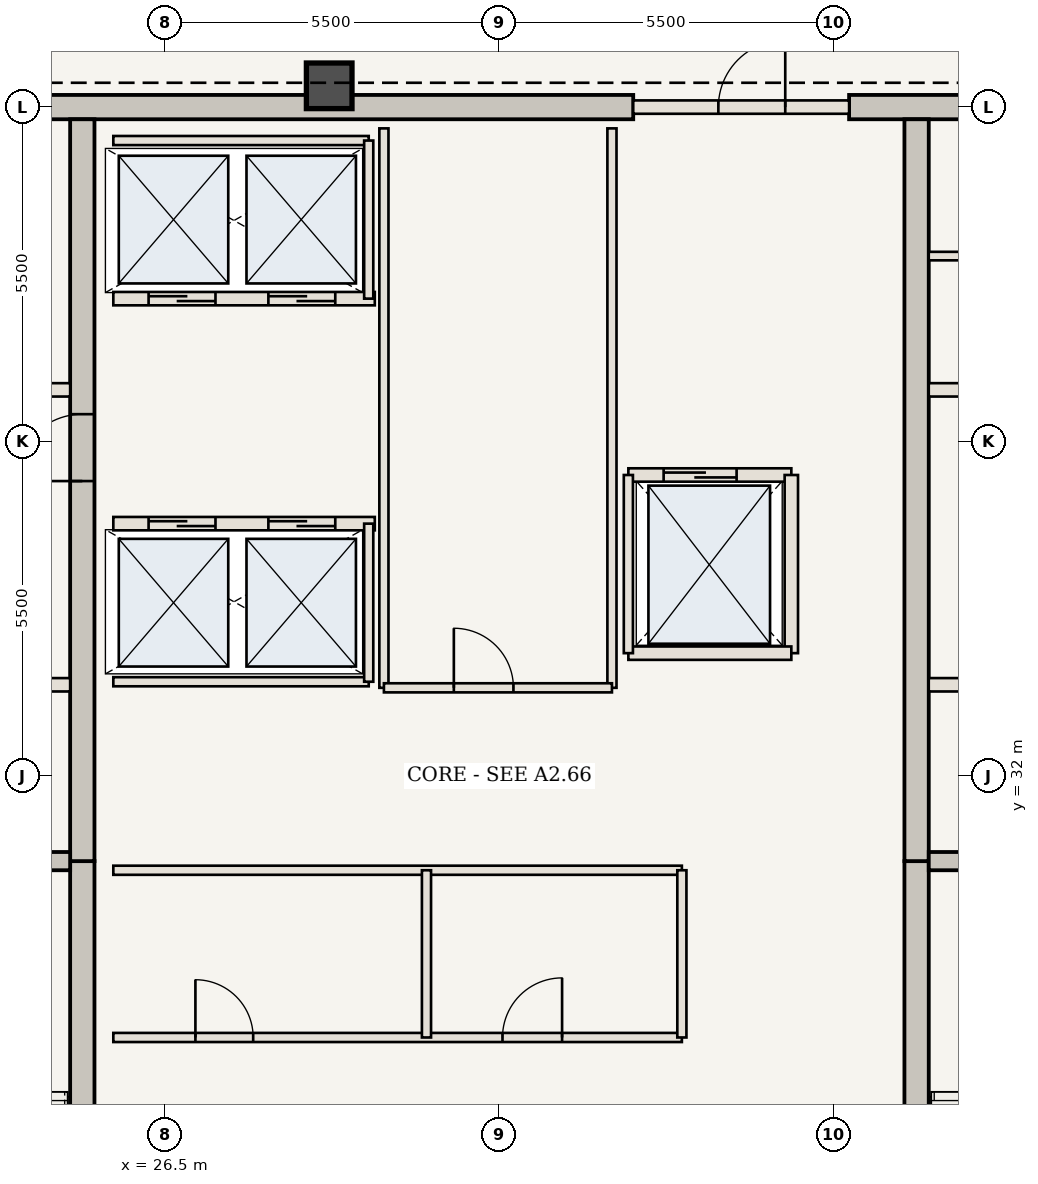
"""IFC4 building model, lengths in metres.
Left out: names, types, materials, properties, quantities, classifications, styles, units other than length and angle.
Written with IfcOpenShell. Run it as: python <this file> out.ifc"""

import sys

from ifc_helpers import new_model, si_unit, direction, frame, frame_2d, origin, origin_2d, place, context, subcontext, project, spatial, rectangle, extrude, element, fill, save


model = new_model("IFC4")
c1 = context("Model", 3, precision=1e-05, world=origin(), true_north=direction((0.0, 1.0)))
c2 = subcontext(c1, "Body", "Model", "MODEL_VIEW")
j1 = project(units=[si_unit("LENGTHUNIT", "METRE"), si_unit("PLANEANGLEUNIT", "RADIAN")], contexts=[c1])
p1 = place(None, origin())
s1 = spatial("IfcSite", under=j1, at=p1, CompositionType="ELEMENT")
p2 = place(p1, origin())
s2 = spatial("IfcBuilding", under=s1, at=p2, CompositionType="ELEMENT")
p3 = place(p2, frame((0.0, 0.0, 308.35)))
s3 = spatial("IfcBuildingStorey", under=s2, at=p3, CompositionType="ELEMENT", Elevation=308.35)
p4 = place(p3, frame((21.41, 43.0, 0.0), z_axis=(0.0, 0.0, 1.0), x_axis=(1.0, 0.0, 0.0)))
e1 = element("IfcWall", 1, at=p4, inside=s3, PredefinedType="SHEAR", context=c2, shape_type="SweptSolid", body=[
    extrude(rectangle(XDim=12.79, YDim=0.4, at=frame_2d((6.395, 0.0))), origin(), (0.0, 0.0, 1.0), 4.9),
])
p5 = place(p3, frame((37.75, 43.0, 0.0), z_axis=(0.0, 0.0, 1.0), x_axis=(1.0, 0.0, 0.0)))
e2 = element("IfcWall", 2, at=p5, inside=s3, PredefinedType="SHEAR", context=c2, shape_type="SweptSolid", body=[
    extrude(rectangle(XDim=4.84, YDim=0.4, at=frame_2d((2.42, 0.0))), origin(), (0.0, 0.0, 1.0), 4.9),
])
p6 = place(p3, frame((25.14, 21.15, 0.0), z_axis=(0.0, 0.0, 1.0), x_axis=(0.0, 1.0, 0.0)))
e3 = element("IfcWall", 3, at=p6, inside=s3, PredefinedType="SHEAR", context=c2, shape_type="SweptSolid", body=[
    extrude(rectangle(XDim=9.45, YDim=0.4, at=frame_2d((4.725, 0.0))), origin(), (0.0, 0.0, 1.0), 4.9),
])
p7 = place(p3, frame((25.14, 30.6, 0.0), z_axis=(0.0, 0.0, 1.0), x_axis=(0.0, 1.0, 0.0)))
e4 = element("IfcWall", 4, at=p7, inside=s3, PredefinedType="SHEAR", context=c2, shape_type="SweptSolid", body=[
    extrude(rectangle(XDim=12.2, YDim=0.4, at=frame_2d((6.1, 0.0))), origin(), (0.0, 0.0, 1.0), 4.9),
])
p8 = place(p7, frame((6.25, 0.0, 0.0)))
e5 = element("IfcOpeningElement", 5, at=p8, cuts=e4, PredefinedType="OPENING", context=c2, shape_type="SweptSolid", body=[
    extrude(rectangle(XDim=1.1, YDim=2.15, at=frame_2d((0.55, 1.075))), frame((0.0, 0.21, 0.0), z_axis=(0.0, -1.0, 0.0), x_axis=(1.0, 0.0, 0.0)), (0.0, 0.0, 1.0), 0.42),
])
p9 = place(p3, frame((38.86, 21.15, 0.0), z_axis=(0.0, 0.0, 1.0), x_axis=(0.0, 1.0, 0.0)))
e6 = element("IfcWall", 6, at=p9, inside=s3, PredefinedType="SHEAR", context=c2, shape_type="SweptSolid", body=[
    extrude(rectangle(XDim=9.45, YDim=0.4, at=frame_2d((4.725, 0.0))), origin(), (0.0, 0.0, 1.0), 4.9),
])
p10 = place(p3, frame((38.86, 30.6, 0.0), z_axis=(0.0, 0.0, 1.0), x_axis=(0.0, 1.0, 0.0)))
e7 = element("IfcWall", 7, at=p10, inside=s3, PredefinedType="SHEAR", context=c2, shape_type="SweptSolid", body=[
    extrude(rectangle(XDim=12.2, YDim=0.4, at=frame_2d((6.1, 0.0))), origin(), (0.0, 0.0, 1.0), 4.9),
])
p11 = place(p3, frame((29.2, 43.35, 0.0), z_axis=(0.0, 0.0, 1.0), x_axis=(1.0, 0.0, 0.0)))
e8 = element("IfcColumn", 8, at=p11, inside=s3, PredefinedType="COLUMN", context=c2, shape_type="SweptSolid", body=[
    extrude(rectangle(XDim=0.75, YDim=0.75, at=origin_2d()), origin(), (0.0, 0.0, 1.0), 4.9),
])
for number, where, z_axis, x_axis in (
    (9, (21.41, 30.6, 0.0), (0.0, 0.0, 1.0), (1.0, 0.0, 0.0)),
    (10, (39.06, 30.6, 0.0), (0.0, 0.0, 1.0), (1.0, 0.0, 0.0)),
):
    element("IfcWall", number, at=place(p3, frame(where, z_axis=z_axis, x_axis=x_axis)), inside=s3, PredefinedType="SHEAR", context=c2, shape_type="SweptSolid", body=[
        extrude(rectangle(XDim=3.53, YDim=0.3, at=frame_2d((1.765, 0.0))), origin(), (0.0, 0.0, 1.0), 4.64),
    ])
p12 = place(p3, frame((21.41, 33.5, 0.0), z_axis=(0.0, 0.0, 1.0), x_axis=(1.0, 0.0, 0.0)))
e11 = element("IfcWall", 11, at=p12, inside=s3, PredefinedType="STANDARD", context=c2, shape_type="SweptSolid", body=[
    extrude(rectangle(XDim=3.53, YDim=0.22, at=frame_2d((1.765, 0.0))), origin(), (0.0, 0.0, 1.0), 4.64),
])
p13 = place(p12, frame((0.75, 0.0, 0.0)))
e12 = element("IfcOpeningElement", 12, at=p13, cuts=e11, PredefinedType="OPENING", context=c2, shape_type="SweptSolid", body=[
    extrude(rectangle(XDim=1.2, YDim=2.2, at=frame_2d((0.6, 1.1))), frame((0.0, 0.12, 0.0), z_axis=(0.0, -1.0, 0.0), x_axis=(1.0, 0.0, 0.0)), (0.0, 0.0, 1.0), 0.24),
])
p14 = place(p3, frame((39.06, 33.5, 0.0), z_axis=(0.0, 0.0, 1.0), x_axis=(1.0, 0.0, 0.0)))
e13 = element("IfcWall", 13, at=p14, inside=s3, PredefinedType="STANDARD", context=c2, shape_type="SweptSolid", body=[
    extrude(rectangle(XDim=3.53, YDim=0.22, at=frame_2d((1.765, 0.0))), origin(), (0.0, 0.0, 1.0), 4.64),
])
p15 = place(p14, frame((1.55, 0.0, 0.0)))
e14 = element("IfcOpeningElement", 14, at=p15, cuts=e13, PredefinedType="OPENING", context=c2, shape_type="SweptSolid", body=[
    extrude(rectangle(XDim=1.2, YDim=2.2, at=frame_2d((0.6, 1.1))), frame((0.0, 0.12, 0.0), z_axis=(0.0, -1.0, 0.0), x_axis=(1.0, 0.0, 0.0)), (0.0, 0.0, 1.0), 0.24),
])
for number, where, z_axis, x_axis in (
    (15, (21.41, 38.35, 0.0), (0.0, 0.0, 1.0), (1.0, 0.0, 0.0)),
    (16, (39.06, 38.35, 0.0), (0.0, 0.0, 1.0), (1.0, 0.0, 0.0)),
):
    element("IfcWall", number, at=place(p3, frame(where, z_axis=z_axis, x_axis=x_axis)), inside=s3, PredefinedType="STANDARD", context=c2, shape_type="SweptSolid", body=[
        extrude(rectangle(XDim=3.53, YDim=0.22, at=frame_2d((1.765, 0.0))), origin(), (0.0, 0.0, 1.0), 4.64),
    ])
p16 = place(p3, frame((39.06, 40.55, 0.0), z_axis=(0.0, 0.0, 1.0), x_axis=(1.0, 0.0, 0.0)))
e17 = element("IfcWall", 17, at=p16, inside=s3, PredefinedType="STANDARD", context=c2, shape_type="SweptSolid", body=[
    extrude(rectangle(XDim=3.53, YDim=0.14, at=frame_2d((1.765, 0.0))), origin(), (0.0, 0.0, 1.0), 4.64),
])
p17 = place(p3, frame((25.65, 27.7, 0.0), z_axis=(0.0, 0.0, 1.0), x_axis=(1.0, 0.0, 0.0)))
e18 = element("IfcWall", 18, at=p17, inside=s3, PredefinedType="STANDARD", context=c2, shape_type="SweptSolid", body=[
    extrude(rectangle(XDim=9.35, YDim=0.15, at=frame_2d((4.675, 0.0))), origin(), (0.0, 0.0, 1.0), 4.64),
])
p18 = place(p17, frame((1.35, 0.0, 0.0)))
e19 = element("IfcOpeningElement", 19, at=p18, cuts=e18, PredefinedType="OPENING", context=c2, shape_type="SweptSolid", body=[
    extrude(rectangle(XDim=0.95, YDim=2.15, at=frame_2d((0.475, 1.075))), frame((0.0, 0.085, 0.0), z_axis=(0.0, -1.0, 0.0), x_axis=(1.0, 0.0, 0.0)), (0.0, 0.0, 1.0), 0.17),
])
p19 = place(p17, frame((6.4, 0.0, 0.0)))
e20 = element("IfcOpeningElement", 20, at=p19, cuts=e18, PredefinedType="OPENING", context=c2, shape_type="SweptSolid", body=[
    extrude(rectangle(XDim=0.98, YDim=2.2, at=frame_2d((0.49, 1.1))), frame((0.0, 0.085, 0.0), z_axis=(0.0, -1.0, 0.0), x_axis=(1.0, 0.0, 0.0)), (0.0, 0.0, 1.0), 0.17),
])
p20 = place(p3, frame((25.65, 30.45, 0.0), z_axis=(0.0, 0.0, 1.0), x_axis=(1.0, 0.0, 0.0)))
e21 = element("IfcWall", 21, at=p20, inside=s3, PredefinedType="STANDARD", context=c2, shape_type="SweptSolid", body=[
    extrude(rectangle(XDim=9.35, YDim=0.15, at=frame_2d((4.675, 0.0))), origin(), (0.0, 0.0, 1.0), 4.64),
])
for number, where, z_axis, x_axis in (
    (22, (30.8, 27.7, 0.0), (0.0, 0.0, 1.0), (0.0, 1.0, 0.0)),
    (23, (35.0, 27.7, 0.0), (0.0, 0.0, 1.0), (0.0, 1.0, 0.0)),
):
    element("IfcWall", number, at=place(p3, frame(where, z_axis=z_axis, x_axis=x_axis)), inside=s3, PredefinedType="STANDARD", context=c2, shape_type="SweptSolid", body=[
        extrude(rectangle(XDim=2.75, YDim=0.15, at=frame_2d((1.375, 0.0))), origin(), (0.0, 0.0, 1.0), 4.64),
    ])
p21 = place(p3, frame((25.65, 36.15, 0.0), z_axis=(0.0, 0.0, 1.0), x_axis=(1.0, 0.0, 0.0)))
e24 = element("IfcWall", 24, at=p21, inside=s3, PredefinedType="STANDARD", context=c2, shape_type="SweptSolid", body=[
    extrude(rectangle(XDim=4.3, YDim=0.22, at=frame_2d((2.15, 0.0))), origin(), (0.0, 0.0, 1.0), 4.64),
])
p22 = place(p21, frame((0.58, 0.0, 0.0)))
e25 = element("IfcOpeningElement", 25, at=p22, cuts=e24, PredefinedType="OPENING", context=c2, shape_type="SweptSolid", body=[
    extrude(rectangle(XDim=1.1, YDim=2.15, at=frame_2d((0.55, 1.075))), frame((0.0, 0.12, 0.0), z_axis=(0.0, -1.0, 0.0), x_axis=(1.0, 0.0, 0.0)), (0.0, 0.0, 1.0), 0.24),
])
p23 = place(p21, frame((2.55, 0.0, 0.0)))
e26 = element("IfcOpeningElement", 26, at=p23, cuts=e24, PredefinedType="OPENING", context=c2, shape_type="SweptSolid", body=[
    extrude(rectangle(XDim=1.1, YDim=2.15, at=frame_2d((0.55, 1.075))), frame((0.0, 0.12, 0.0), z_axis=(0.0, -1.0, 0.0), x_axis=(1.0, 0.0, 0.0)), (0.0, 0.0, 1.0), 0.24),
])
p24 = place(p3, frame((25.65, 33.55, 0.0), z_axis=(0.0, 0.0, 1.0), x_axis=(1.0, 0.0, 0.0)))
e27 = element("IfcWall", 27, at=p24, inside=s3, PredefinedType="STANDARD", context=c2, shape_type="SweptSolid", body=[
    extrude(rectangle(XDim=4.2, YDim=0.15, at=frame_2d((2.1, 0.0))), origin(), (0.0, 0.0, 1.0), 4.64),
])
p25 = place(p3, frame((29.85, 33.55, 0.0), z_axis=(0.0, 0.0, 1.0), x_axis=(0.0, 1.0, 0.0)))
e28 = element("IfcWall", 28, at=p25, inside=s3, PredefinedType="STANDARD", context=c2, shape_type="SweptSolid", body=[
    extrude(rectangle(XDim=2.6, YDim=0.15, at=frame_2d((1.3, 0.0))), origin(), (0.0, 0.0, 1.0), 4.64),
])
p26 = place(p3, frame((25.65, 39.85, 0.0), z_axis=(0.0, 0.0, 1.0), x_axis=(1.0, 0.0, 0.0)))
e29 = element("IfcWall", 29, at=p26, inside=s3, PredefinedType="STANDARD", context=c2, shape_type="SweptSolid", body=[
    extrude(rectangle(XDim=4.3, YDim=0.22, at=frame_2d((2.15, 0.0))), origin(), (0.0, 0.0, 1.0), 4.64),
])
p27 = place(p26, frame((0.58, 0.0, 0.0)))
e30 = element("IfcOpeningElement", 30, at=p27, cuts=e29, PredefinedType="OPENING", context=c2, shape_type="SweptSolid", body=[
    extrude(rectangle(XDim=1.1, YDim=2.15, at=frame_2d((0.55, 1.075))), frame((0.0, 0.12, 0.0), z_axis=(0.0, -1.0, 0.0), x_axis=(1.0, 0.0, 0.0)), (0.0, 0.0, 1.0), 0.24),
])
p28 = place(p26, frame((2.55, 0.0, 0.0)))
e31 = element("IfcOpeningElement", 31, at=p28, cuts=e29, PredefinedType="OPENING", context=c2, shape_type="SweptSolid", body=[
    extrude(rectangle(XDim=1.1, YDim=2.15, at=frame_2d((0.55, 1.075))), frame((0.0, 0.12, 0.0), z_axis=(0.0, -1.0, 0.0), x_axis=(1.0, 0.0, 0.0)), (0.0, 0.0, 1.0), 0.24),
])
p29 = place(p3, frame((25.65, 42.45, 0.0), z_axis=(0.0, 0.0, 1.0), x_axis=(1.0, 0.0, 0.0)))
e32 = element("IfcWall", 32, at=p29, inside=s3, PredefinedType="STANDARD", context=c2, shape_type="SweptSolid", body=[
    extrude(rectangle(XDim=4.2, YDim=0.15, at=frame_2d((2.1, 0.0))), origin(), (0.0, 0.0, 1.0), 4.64),
])
p30 = place(p3, frame((29.85, 39.85, 0.0), z_axis=(0.0, 0.0, 1.0), x_axis=(0.0, 1.0, 0.0)))
e33 = element("IfcWall", 33, at=p30, inside=s3, PredefinedType="STANDARD", context=c2, shape_type="SweptSolid", body=[
    extrude(rectangle(XDim=2.6, YDim=0.15, at=frame_2d((1.3, 0.0))), origin(), (0.0, 0.0, 1.0), 4.64),
])
for number, where, z_axis, x_axis in (
    (34, (30.1, 33.45, 0.0), (0.0, 0.0, 1.0), (0.0, 1.0, 0.0)),
    (35, (33.85, 33.45, 0.0), (0.0, 0.0, 1.0), (0.0, 1.0, 0.0)),
):
    element("IfcWall", number, at=place(p3, frame(where, z_axis=z_axis, x_axis=x_axis)), inside=s3, PredefinedType="STANDARD", context=c2, shape_type="SweptSolid", body=[
        extrude(rectangle(XDim=9.2, YDim=0.15, at=frame_2d((4.6, 0.0))), origin(), (0.0, 0.0, 1.0), 4.64),
    ])
p31 = place(p3, frame((30.1, 33.45, 0.0), z_axis=(0.0, 0.0, 1.0), x_axis=(1.0, 0.0, 0.0)))
e36 = element("IfcWall", 36, at=p31, inside=s3, PredefinedType="STANDARD", context=c2, shape_type="SweptSolid", body=[
    extrude(rectangle(XDim=3.75, YDim=0.15, at=frame_2d((1.875, 0.0))), origin(), (0.0, 0.0, 1.0), 4.64),
])
p32 = place(p31, frame((1.15, 0.0, 0.0)))
e37 = element("IfcOpeningElement", 37, at=p32, cuts=e36, PredefinedType="OPENING", context=c2, shape_type="SweptSolid", body=[
    extrude(rectangle(XDim=0.98, YDim=2.2, at=frame_2d((0.49, 1.1))), frame((0.0, 0.085, 0.0), z_axis=(0.0, -1.0, 0.0), x_axis=(1.0, 0.0, 0.0)), (0.0, 0.0, 1.0), 0.17),
])
p33 = place(p3, frame((34.2, 43.0, 0.0), z_axis=(0.0, 0.0, 1.0), x_axis=(1.0, 0.0, 0.0)))
e38 = element("IfcWall", 38, at=p33, inside=s3, PredefinedType="STANDARD", context=c2, shape_type="SweptSolid", body=[
    extrude(rectangle(XDim=3.55, YDim=0.22, at=frame_2d((1.775, 0.0))), origin(), (0.0, 0.0, 1.0), 4.64),
])
p34 = place(p33, frame((1.4, 0.0, 0.0)))
e39 = element("IfcOpeningElement", 39, at=p34, cuts=e38, PredefinedType="OPENING", context=c2, shape_type="SweptSolid", body=[
    extrude(rectangle(XDim=1.1, YDim=2.15, at=frame_2d((0.55, 1.075))), frame((0.0, 0.12, 0.0), z_axis=(0.0, -1.0, 0.0), x_axis=(1.0, 0.0, 0.0)), (0.0, 0.0, 1.0), 0.24),
])
p35 = place(p3, frame((34.12, 36.95, 0.0), z_axis=(0.0, 0.0, 1.0), x_axis=(1.0, 0.0, 0.0)))
e40 = element("IfcWall", 40, at=p35, inside=s3, PredefinedType="STANDARD", context=c2, shape_type="SweptSolid", body=[
    extrude(rectangle(XDim=2.68, YDim=0.22, at=frame_2d((1.34, 0.0))), origin(), (0.0, 0.0, 1.0), 4.64),
])
p36 = place(p35, frame((0.58, 0.0, 0.0)))
e41 = element("IfcOpeningElement", 41, at=p36, cuts=e40, PredefinedType="OPENING", context=c2, shape_type="SweptSolid", body=[
    extrude(rectangle(XDim=1.2, YDim=2.2, at=frame_2d((0.6, 1.1))), frame((0.0, 0.12, 0.0), z_axis=(0.0, -1.0, 0.0), x_axis=(1.0, 0.0, 0.0)), (0.0, 0.0, 1.0), 0.24),
])
p37 = place(p3, frame((36.8, 34.02, 0.0), z_axis=(0.0, 0.0, 1.0), x_axis=(0.0, 1.0, 0.0)))
e42 = element("IfcWall", 42, at=p37, inside=s3, PredefinedType="STANDARD", context=c2, shape_type="SweptSolid", body=[
    extrude(rectangle(XDim=2.93, YDim=0.22, at=frame_2d((1.465, 0.0))), origin(), (0.0, 0.0, 1.0), 4.64),
])
p38 = place(p3, frame((34.12, 34.02, 0.0), z_axis=(0.0, 0.0, 1.0), x_axis=(1.0, 0.0, 0.0)))
e43 = element("IfcWall", 43, at=p38, inside=s3, PredefinedType="STANDARD", context=c2, shape_type="SweptSolid", body=[
    extrude(rectangle(XDim=2.68, YDim=0.22, at=frame_2d((1.34, 0.0))), origin(), (0.0, 0.0, 1.0), 4.64),
])
p39 = place(p3, frame((34.12, 34.02, 0.0), z_axis=(0.0, 0.0, 1.0), x_axis=(0.0, 1.0, 0.0)))
e44 = element("IfcWall", 44, at=p39, inside=s3, PredefinedType="STANDARD", context=c2, shape_type="SweptSolid", body=[
    extrude(rectangle(XDim=2.93, YDim=0.15, at=frame_2d((1.465, 0.0))), origin(), (0.0, 0.0, 1.0), 4.64),
])
p40 = place(p8, origin())
e45 = element("IfcDoor", 45, at=p40, inside=s3, OperationType="SINGLE_SWING_LEFT", PredefinedType="DOOR", context=c2, shape_type="SweptSolid", body=[
    extrude(rectangle(XDim=1.1, YDim=2.15, at=frame_2d((0.55, 1.075))), frame((0.0, 0.025, 0.0), z_axis=(0.0, -1.0, 0.0), x_axis=(1.0, 0.0, 0.0)), (0.0, 0.0, 1.0), 0.05),
])
fill(e5, e45)
p41 = place(p18, origin())
e46 = element("IfcDoor", 46, at=p41, inside=s3, OperationType="SINGLE_SWING_LEFT", PredefinedType="DOOR", context=c2, shape_type="SweptSolid", body=[
    extrude(rectangle(XDim=0.95, YDim=2.15, at=frame_2d((0.475, 1.075))), frame((0.0, 0.025, 0.0), z_axis=(0.0, -1.0, 0.0), x_axis=(1.0, 0.0, 0.0)), (0.0, 0.0, 1.0), 0.05),
])
fill(e19, e46)
p42 = place(p19, origin())
e47 = element("IfcDoor", 47, at=p42, inside=s3, OperationType="SINGLE_SWING_RIGHT", PredefinedType="DOOR", context=c2, shape_type="SweptSolid", body=[
    extrude(rectangle(XDim=0.98, YDim=2.2, at=frame_2d((0.49, 1.1))), frame((0.0, 0.025, 0.0), z_axis=(0.0, -1.0, 0.0), x_axis=(1.0, 0.0, 0.0)), (0.0, 0.0, 1.0), 0.05),
])
fill(e20, e47)
p43 = place(p22, origin())
e48 = element("IfcDoor", 48, at=p43, inside=s3, OperationType="DOUBLE_DOOR_SLIDING", PredefinedType="DOOR", context=c2, shape_type="SweptSolid", body=[
    extrude(rectangle(XDim=1.1, YDim=2.15, at=frame_2d((0.55, 1.075))), frame((0.0, 0.025, 0.0), z_axis=(0.0, -1.0, 0.0), x_axis=(1.0, 0.0, 0.0)), (0.0, 0.0, 1.0), 0.05),
])
fill(e25, e48)
p44 = place(p23, origin())
e49 = element("IfcDoor", 49, at=p44, inside=s3, OperationType="DOUBLE_DOOR_SLIDING", PredefinedType="DOOR", context=c2, shape_type="SweptSolid", body=[
    extrude(rectangle(XDim=1.1, YDim=2.15, at=frame_2d((0.55, 1.075))), frame((0.0, 0.025, 0.0), z_axis=(0.0, -1.0, 0.0), x_axis=(1.0, 0.0, 0.0)), (0.0, 0.0, 1.0), 0.05),
])
fill(e26, e49)
p45 = place(p27, origin())
e50 = element("IfcDoor", 50, at=p45, inside=s3, OperationType="DOUBLE_DOOR_SLIDING", PredefinedType="DOOR", context=c2, shape_type="SweptSolid", body=[
    extrude(rectangle(XDim=1.1, YDim=2.15, at=frame_2d((0.55, 1.075))), frame((0.0, 0.025, 0.0), z_axis=(0.0, -1.0, 0.0), x_axis=(1.0, 0.0, 0.0)), (0.0, 0.0, 1.0), 0.05),
])
fill(e30, e50)
p46 = place(p28, origin())
e51 = element("IfcDoor", 51, at=p46, inside=s3, OperationType="DOUBLE_DOOR_SLIDING", PredefinedType="DOOR", context=c2, shape_type="SweptSolid", body=[
    extrude(rectangle(XDim=1.1, YDim=2.15, at=frame_2d((0.55, 1.075))), frame((0.0, 0.025, 0.0), z_axis=(0.0, -1.0, 0.0), x_axis=(1.0, 0.0, 0.0)), (0.0, 0.0, 1.0), 0.05),
])
fill(e31, e51)
p47 = place(p32, origin())
e52 = element("IfcDoor", 52, at=p47, inside=s3, OperationType="SINGLE_SWING_LEFT", PredefinedType="DOOR", context=c2, shape_type="SweptSolid", body=[
    extrude(rectangle(XDim=0.98, YDim=2.2, at=frame_2d((0.49, 1.1))), frame((0.0, 0.025, 0.0), z_axis=(0.0, -1.0, 0.0), x_axis=(1.0, 0.0, 0.0)), (0.0, 0.0, 1.0), 0.05),
])
fill(e37, e52)
p48 = place(p34, origin())
e53 = element("IfcDoor", 53, at=p48, inside=s3, OperationType="SINGLE_SWING_RIGHT", PredefinedType="DOOR", context=c2, shape_type="SweptSolid", body=[
    extrude(rectangle(XDim=1.1, YDim=2.15, at=frame_2d((0.55, 1.075))), frame((0.0, 0.025, 0.0), z_axis=(0.0, -1.0, 0.0), x_axis=(1.0, 0.0, 0.0)), (0.0, 0.0, 1.0), 0.05),
])
fill(e39, e53)
p49 = place(p36, origin())
e54 = element("IfcDoor", 54, at=p49, inside=s3, OperationType="DOUBLE_DOOR_SLIDING", PredefinedType="DOOR", context=c2, shape_type="SweptSolid", body=[
    extrude(rectangle(XDim=1.2, YDim=2.2, at=frame_2d((0.6, 1.1))), frame((0.0, 0.025, 0.0), z_axis=(0.0, -1.0, 0.0), x_axis=(1.0, 0.0, 0.0)), (0.0, 0.0, 1.0), 0.05),
])
fill(e41, e54)
save(model, sys.argv[1])
